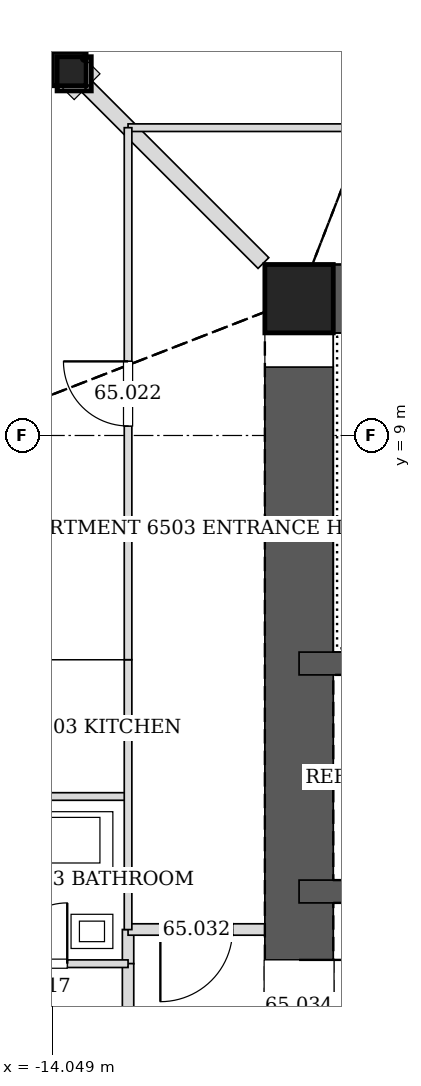
"""IFC4 building model, lengths in metres.
Left out: names, types, materials, properties, quantities, classifications, styles, units other than length and angle.
Written with IfcOpenShell. Run it as: python <this file> out.ifc"""

import sys

from ifc_helpers import new_model, si_unit, direction, frame, frame_2d, origin, origin_2d, place, context, subcontext, project, spatial, rectangle, hollow_rectangle, extrude, element, fill, save


model = new_model("IFC4")
c1 = context("Model", 3, precision=1e-05, world=origin(), true_north=direction((0.0, 1.0)))
c2 = subcontext(c1, "Body", "Model", "MODEL_VIEW")
j1 = project(units=[si_unit("LENGTHUNIT", "METRE"), si_unit("PLANEANGLEUNIT", "RADIAN")], contexts=[c1])
p1 = place(None, origin())
s1 = spatial("IfcSite", under=j1, at=p1, CompositionType="ELEMENT")
p2 = place(p1, origin())
s2 = spatial("IfcBuilding", under=s1, at=p2, CompositionType="ELEMENT")
p3 = place(p2, frame((0.0, 0.0, 270.8)))
s3 = spatial("IfcBuildingStorey", under=s2, at=p3, CompositionType="ELEMENT", Elevation=270.8)
p4 = place(p3, frame((-13.827, 13.827, 0.0), z_axis=(0.020026431307, -0.020026431307, 0.999598861593), x_axis=(0.707106781187, 0.707106781187, 0.0)))
e1 = element("IfcColumn", 1, at=p4, inside=s3, PredefinedType="COLUMN", context=c2, shape_type="SweptSolid", body=[
    extrude(hollow_rectangle(XDim=0.45, YDim=0.45, WallThickness=0.02, at=origin_2d()), origin(), (0.0, 0.0, 1.0), 3.401),
])
p5 = place(p3, frame((-10.8, 10.8, 0.0), z_axis=(0.0, 0.0, 1.0), x_axis=(1.0, 0.0, 0.0)))
e2 = element("IfcColumn", 2, at=p5, inside=s3, PredefinedType="COLUMN", context=c2, shape_type="SweptSolid", body=[
    extrude(hollow_rectangle(XDim=0.9, YDim=0.9, WallThickness=0.04, at=origin_2d()), origin(), (0.0, 0.0, 1.0), 3.4),
])
p6 = place(p3, frame((10.8, 10.8, 0.0), z_axis=(0.0, 0.0, 1.0), x_axis=(-1.0, 0.0, 0.0)))
e3 = element("IfcWall", 3, at=p6, inside=s3, PredefinedType="SOLIDWALL", context=c2, shape_type="SweptSolid", body=[
    extrude(rectangle(XDim=21.6, YDim=0.9, at=frame_2d((10.8, 0.0))), origin(), (0.0, 0.0, 1.0), 3.4),
])
p7 = place(p6, frame((10.05, 0.0, 0.0)))
e4 = element("IfcOpeningElement", 4, at=p7, cuts=e3, PredefinedType="OPENING", context=c2, shape_type="SweptSolid", body=[
    extrude(rectangle(XDim=1.5, YDim=2.1, at=frame_2d((0.75, 1.05))), frame((0.0, 0.46, 0.0), z_axis=(0.0, -1.0, 0.0), x_axis=(1.0, 0.0, 0.0)), (0.0, 0.0, 1.0), 0.92),
])
p8 = place(p3, frame((-10.8, 10.8, 0.0), z_axis=(0.0, 0.0, 1.0), x_axis=(0.0, -1.0, 0.0)))
e5 = element("IfcWall", 5, at=p8, inside=s3, PredefinedType="SOLIDWALL", context=c2, shape_type="SweptSolid", body=[
    extrude(rectangle(XDim=21.6, YDim=0.9, at=frame_2d((10.8, 0.0))), origin(), (0.0, 0.0, 1.0), 3.4),
])
p9 = place(p8, frame((8.7, 0.0, 0.0)))
e6 = element("IfcOpeningElement", 6, at=p9, cuts=e5, PredefinedType="OPENING", context=c2, shape_type="SweptSolid", body=[
    extrude(rectangle(XDim=1.2, YDim=2.1, at=frame_2d((0.6, 1.05))), frame((0.0, 0.46, 0.0), z_axis=(0.0, -1.0, 0.0), x_axis=(1.0, 0.0, 0.0)), (0.0, 0.0, 1.0), 0.92),
])
p10 = place(p8, frame((11.7, 0.0, 0.0)))
e7 = element("IfcOpeningElement", 7, at=p10, cuts=e5, PredefinedType="OPENING", context=c2, shape_type="SweptSolid", body=[
    extrude(rectangle(XDim=1.2, YDim=2.1, at=frame_2d((0.6, 1.05))), frame((0.0, 0.46, 0.0), z_axis=(0.0, -1.0, 0.0), x_axis=(1.0, 0.0, 0.0)), (0.0, 0.0, 1.0), 0.92),
])
p11 = place(p3, frame((-10.8, 3.0, 0.0), z_axis=(0.0, 0.0, 1.0), x_axis=(1.0, 0.0, 0.0)))
e8 = element("IfcWall", 8, at=p11, inside=s3, PredefinedType="SOLIDWALL", context=c2, shape_type="SweptSolid", body=[
    extrude(rectangle(XDim=21.6, YDim=0.3, at=frame_2d((10.8, 0.0))), origin(), (0.0, 0.0, 1.0), 3.4),
])
p12 = place(p11, frame((1.65, 0.0, 0.0)))
e9 = element("IfcOpeningElement", 9, at=p12, cuts=e8, PredefinedType="OPENING", context=c2, shape_type="SweptSolid", body=[
    extrude(rectangle(XDim=0.9, YDim=2.1, at=frame_2d((0.45, 1.05))), frame((0.0, 0.16, 0.0), z_axis=(0.0, -1.0, 0.0), x_axis=(1.0, 0.0, 0.0)), (0.0, 0.0, 1.0), 0.32),
])
p13 = place(p11, frame((13.25, 0.0, 0.0)))
e10 = element("IfcOpeningElement", 10, at=p13, cuts=e8, PredefinedType="OPENING", context=c2, shape_type="SweptSolid", body=[
    extrude(rectangle(XDim=0.9, YDim=2.1, at=frame_2d((0.45, 1.05))), frame((0.0, 0.16, 0.0), z_axis=(0.0, -1.0, 0.0), x_axis=(1.0, 0.0, 0.0)), (0.0, 0.0, 1.0), 0.32),
])
p14 = place(p11, frame((16.15, 0.0, 0.0)))
e11 = element("IfcOpeningElement", 11, at=p14, cuts=e8, PredefinedType="OPENING", context=c2, shape_type="SweptSolid", body=[
    extrude(rectangle(XDim=0.9, YDim=2.1, at=frame_2d((0.45, 1.05))), frame((0.0, 0.16, 0.0), z_axis=(0.0, -1.0, 0.0), x_axis=(1.0, 0.0, 0.0)), (0.0, 0.0, 1.0), 0.32),
])
p15 = place(p11, frame((4.55, 0.0, 0.0)))
e12 = element("IfcOpeningElement", 12, at=p15, cuts=e8, PredefinedType="OPENING", context=c2, shape_type="SweptSolid", body=[
    extrude(rectangle(XDim=0.9, YDim=2.1, at=frame_2d((0.45, 1.05))), frame((0.0, 0.16, 0.0), z_axis=(0.0, -1.0, 0.0), x_axis=(1.0, 0.0, 0.0)), (0.0, 0.0, 1.0), 0.32),
])
p16 = place(p11, frame((7.45, 0.0, 0.0)))
e13 = element("IfcOpeningElement", 13, at=p16, cuts=e8, PredefinedType="OPENING", context=c2, shape_type="SweptSolid", body=[
    extrude(rectangle(XDim=0.9, YDim=2.1, at=frame_2d((0.45, 1.05))), frame((0.0, 0.16, 0.0), z_axis=(0.0, -1.0, 0.0), x_axis=(1.0, 0.0, 0.0)), (0.0, 0.0, 1.0), 0.32),
])
p17 = place(p11, frame((19.05, 0.0, 0.0)))
e14 = element("IfcOpeningElement", 14, at=p17, cuts=e8, PredefinedType="OPENING", context=c2, shape_type="SweptSolid", body=[
    extrude(rectangle(XDim=0.9, YDim=2.1, at=frame_2d((0.45, 1.05))), frame((0.0, 0.16, 0.0), z_axis=(0.0, -1.0, 0.0), x_axis=(1.0, 0.0, 0.0)), (0.0, 0.0, 1.0), 0.32),
])
p18 = place(p3, frame((-10.8, 6.0, 0.0), z_axis=(0.0, 0.0, 1.0), x_axis=(1.0, 0.0, 0.0)))
e15 = element("IfcWall", 15, at=p18, inside=s3, PredefinedType="SOLIDWALL", context=c2, shape_type="SweptSolid", body=[
    extrude(rectangle(XDim=21.6, YDim=0.3, at=frame_2d((10.8, 0.0))), origin(), (0.0, 0.0, 1.0), 3.4),
])
p19 = place(p18, frame((10.25, 0.0, 0.0)))
e16 = element("IfcOpeningElement", 16, at=p19, cuts=e15, PredefinedType="OPENING", context=c2, shape_type="SweptSolid", body=[
    extrude(rectangle(XDim=1.1, YDim=2.1, at=frame_2d((0.55, 1.05))), frame((0.0, 0.16, 0.0), z_axis=(0.0, -1.0, 0.0), x_axis=(1.0, 0.0, 0.0)), (0.0, 0.0, 1.0), 0.32),
])
p20 = place(p3, frame((-13.05, 2.5, 0.0), z_axis=(0.0, 0.0, 1.0), x_axis=(0.0, -1.0, 0.0)))
e17 = element("IfcWall", 17, at=p20, inside=s3, PredefinedType="PARTITIONING", context=c2, shape_type="SweptSolid", body=[
    extrude(rectangle(XDim=0.451, YDim=0.15, at=frame_2d((0.226, 0.0))), origin(), (0.0, 0.0, 1.0), 3.2),
])
p21 = place(p3, frame((-13.05, 2.051, 0.0), z_axis=(0.0, 0.0, 1.0), x_axis=(0.0, -1.0, 0.0)))
e18 = element("IfcWall", 18, at=p21, inside=s3, PredefinedType="PARTITIONING", context=c2, shape_type="SweptSolid", body=[
    extrude(rectangle(XDim=9.602, YDim=0.15, at=frame_2d((4.801, 0.0))), origin(), (0.0, 0.0, 1.0), 2.344),
])
p22 = place(p3, frame((-11.25, 2.5, 0.0), z_axis=(0.0, 0.0, 1.0), x_axis=(-1.0, 0.0, 0.0)))
e19 = element("IfcWall", 19, at=p22, inside=s3, PredefinedType="PARTITIONING", context=c2, shape_type="SweptSolid", body=[
    extrude(rectangle(XDim=1.8, YDim=0.15, at=frame_2d((0.9, 0.0))), origin(), (0.0, 0.0, 1.0), 3.2),
])
p23 = place(p22, frame((0.425, 0.0, 0.0)))
e20 = element("IfcOpeningElement", 20, at=p23, cuts=e19, PredefinedType="OPENING", context=c2, shape_type="SweptSolid", body=[
    extrude(rectangle(XDim=0.95, YDim=2.1, at=frame_2d((0.475, 1.05))), frame((0.0, 0.085, 0.0), z_axis=(0.0, -1.0, 0.0), x_axis=(1.0, 0.0, 0.0)), (0.0, 0.0, 1.0), 0.17),
])
p24 = place(p3, frame((-13.586, 13.586, 0.0), z_axis=(0.0, 0.0, 1.0), x_axis=(0.707106781187, -0.707106781187, 0.0)))
e21 = element("IfcWall", 21, at=p24, inside=s3, PredefinedType="PARTITIONING", context=c2, shape_type="SweptSolid", body=[
    extrude(rectangle(XDim=3.277, YDim=0.2, at=frame_2d((1.638, 0.0))), origin(), (0.0, 0.0, 1.0), 2.591),
])
p25 = place(p3, frame((-13.05, 13.05, 0.0), z_axis=(0.0, 0.0, 1.0), x_axis=(1.0, 0.0, 0.0)))
e22 = element("IfcWall", 22, at=p25, inside=s3, PredefinedType="PARTITIONING", context=c2, shape_type="SweptSolid", body=[
    extrude(rectangle(XDim=7.0, YDim=0.1, at=frame_2d((3.5, 0.0))), origin(), (0.0, 0.0, 1.0), 2.349),
])
p26 = place(p25, frame((3.075, 0.0, 0.0)))
e23 = element("IfcOpeningElement", 23, at=p26, cuts=e22, PredefinedType="OPENING", context=c2, shape_type="SweptSolid", body=[
    extrude(rectangle(XDim=0.85, YDim=2.1, at=frame_2d((0.425, 1.05))), frame((0.0, 0.06, 0.0), z_axis=(0.0, -1.0, 0.0), x_axis=(1.0, 0.0, 0.0)), (0.0, 0.0, 1.0), 0.12),
])
p27 = place(p3, frame((-15.45, 4.25, 0.0), z_axis=(0.0, 0.0, 1.0), x_axis=(1.0, 0.0, 0.0)))
e24 = element("IfcWall", 24, at=p27, inside=s3, PredefinedType="PARTITIONING", context=c2, shape_type="SweptSolid", body=[
    extrude(rectangle(XDim=2.4, YDim=0.1, at=frame_2d((1.2, 0.0))), origin(), (0.0, 0.0, 1.0), 2.591),
])
p28 = place(p3, frame((-13.05, 6.05, 0.0), z_axis=(0.0, 0.0, 1.0), x_axis=(0.0, -1.0, 0.0)))
e25 = element("IfcWall", 25, at=p28, inside=s3, PredefinedType="PARTITIONING", context=c2, shape_type="SweptSolid", body=[
    extrude(rectangle(XDim=3.551, YDim=0.1, at=frame_2d((1.775, 0.0))), origin(), (0.0, 0.0, 1.0), 3.2),
])
p29 = place(p3, frame((-15.45, 2.05, 0.0), z_axis=(0.0, 0.0, 1.0), x_axis=(1.0, 0.0, 0.0)))
e26 = element("IfcWall", 26, at=p29, inside=s3, PredefinedType="PARTITIONING", context=c2, shape_type="SweptSolid", body=[
    extrude(rectangle(XDim=2.4, YDim=0.1, at=frame_2d((1.2, 0.0))), origin(), (0.0, 0.0, 1.0), 2.591),
])
p30 = place(p29, frame((0.8, 0.0, 0.0)))
e27 = element("IfcOpeningElement", 27, at=p30, cuts=e26, PredefinedType="OPENING", context=c2, shape_type="SweptSolid", body=[
    extrude(rectangle(XDim=0.8, YDim=2.1, at=frame_2d((0.4, 1.05))), frame((0.0, 0.06, 0.0), z_axis=(0.0, -1.0, 0.0), x_axis=(1.0, 0.0, 0.0)), (0.0, 0.0, 1.0), 0.12),
])
p31 = place(p3, frame((-13.05, 6.05, 0.0), z_axis=(0.0, 0.0, 1.0), x_axis=(0.0, 1.0, 0.0)))
e28 = element("IfcWall", 28, at=p31, inside=s3, PredefinedType="PARTITIONING", context=c2, shape_type="SweptSolid", body=[
    extrude(rectangle(XDim=7.0, YDim=0.1, at=frame_2d((3.5, 0.0))), origin(), (0.0, 0.0, 1.0), 2.349),
])
p32 = place(p31, frame((3.075, 0.0, 0.0)))
e29 = element("IfcOpeningElement", 29, at=p32, cuts=e28, PredefinedType="OPENING", context=c2, shape_type="SweptSolid", body=[
    extrude(rectangle(XDim=0.85, YDim=2.1, at=frame_2d((0.425, 1.05))), frame((0.0, 0.06, 0.0), z_axis=(0.0, -1.0, 0.0), x_axis=(1.0, 0.0, 0.0)), (0.0, 0.0, 1.0), 0.12),
])
p33 = place(p30, origin())
e30 = element("IfcDoor", 30, at=p33, inside=s3, OperationType="SINGLE_SWING_RIGHT", PredefinedType="DOOR", context=c2, shape_type="SweptSolid", body=[
    extrude(rectangle(XDim=0.8, YDim=2.1, at=frame_2d((0.4, 1.05))), frame((0.0, 0.025, 0.0), z_axis=(0.0, -1.0, 0.0), x_axis=(1.0, 0.0, 0.0)), (0.0, 0.0, 1.0), 0.05),
])
fill(e27, e30)
p34 = place(p32, origin())
e31 = element("IfcDoor", 31, at=p34, inside=s3, OperationType="SINGLE_SWING_RIGHT", PredefinedType="DOOR", context=c2, shape_type="SweptSolid", body=[
    extrude(rectangle(XDim=0.85, YDim=2.1, at=frame_2d((0.425, 1.05))), frame((0.0, 0.025, 0.0), z_axis=(0.0, -1.0, 0.0), x_axis=(1.0, 0.0, 0.0)), (0.0, 0.0, 1.0), 0.05),
])
fill(e29, e31)
p35 = place(p23, origin())
e32 = element("IfcDoor", 32, at=p35, inside=s3, OperationType="SINGLE_SWING_RIGHT", PredefinedType="DOOR", context=c2, shape_type="SweptSolid", body=[
    extrude(rectangle(XDim=0.95, YDim=2.1, at=frame_2d((0.475, 1.05))), frame((0.0, 0.025, 0.0), z_axis=(0.0, -1.0, 0.0), x_axis=(1.0, 0.0, 0.0)), (0.0, 0.0, 1.0), 0.05),
])
fill(e20, e32)
p36 = place(p9, origin())
e33 = element("IfcDoor", 33, at=p36, inside=s3, OperationType="SINGLE_SWING_LEFT", PredefinedType="DOOR", context=c2, shape_type="SweptSolid", body=[
    extrude(rectangle(XDim=1.2, YDim=2.1, at=frame_2d((0.6, 1.05))), frame((0.0, 0.025, 0.0), z_axis=(0.0, -1.0, 0.0), x_axis=(1.0, 0.0, 0.0)), (0.0, 0.0, 1.0), 0.05),
])
fill(e6, e33)
save(model, sys.argv[1])
